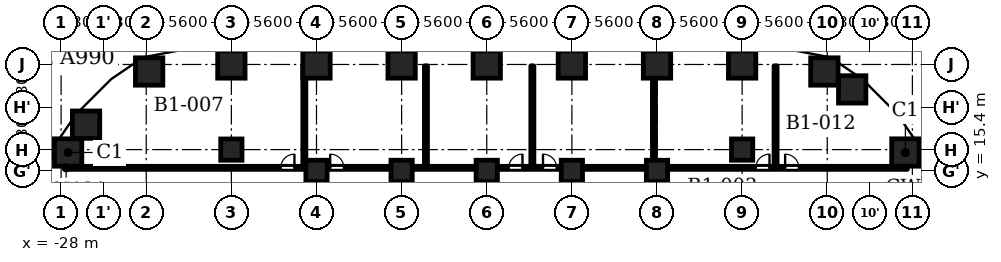
"""IFC4 building model, lengths in metres.
Left out: names, types, materials, properties, quantities, classifications, styles, units other than length and angle.
Written with IfcOpenShell. Run it as: python <this file> out.ifc"""

import sys

from ifc_helpers import new_model, si_unit, direction, frame, frame_2d, origin, origin_2d, place, context, subcontext, project, spatial, polyline, rectangle, outline, extrude, element, fill, save


model = new_model("IFC4")
c1 = context("Model", 3, precision=1e-05, world=origin(), true_north=direction((0.0, 1.0)))
c2 = subcontext(c1, "Body", "Model", "MODEL_VIEW")
j1 = project(units=[si_unit("LENGTHUNIT", "METRE"), si_unit("PLANEANGLEUNIT", "RADIAN")], contexts=[c1])
p1 = place(None, origin())
s1 = spatial("IfcSite", under=j1, at=p1, CompositionType="ELEMENT")
p2 = place(p1, origin())
s2 = spatial("IfcBuilding", under=s1, at=p2, CompositionType="ELEMENT")
p3 = place(p2, frame((0.0, 0.0, -4.5)))
s3 = spatial("IfcBuildingStorey", under=s2, at=p3, CompositionType="ELEMENT", Elevation=-4.5)
p4 = place(p3, frame((0.0, 0.0, -0.5)))
e1 = element("IfcWall", 1, at=p4, inside=s3, PredefinedType="SOLIDWALL", context=c2, shape_type="SweptSolid", body=[
    extrude(outline(polyline([(-29.45, 10.0), (-28.95, 10.0), (-28.95, 14.49), (-28.472, 16.996), (-27.038, 19.105), (-26.144, 20.0), (-26.851, 20.0), (-27.425, 19.426), (-28.944, 17.191), (-29.45, 14.537), (-29.45, 10.0)])), origin(), (0.0, 0.0, 1.0), 5.0),
])
e2 = element("IfcWall", 2, at=p4, inside=s3, PredefinedType="SOLIDWALL", context=c2, shape_type="SweptSolid", body=[
    extrude(outline(polyline([(-26.851, 20.0), (-26.144, 20.0), (-24.705, 21.438), (-22.595, 22.872), (-20.09, 23.35), (-20.0, 23.35), (-20.0, 23.85), (-20.137, 23.85), (-22.791, 23.344), (-25.025, 21.825), (-26.851, 20.0)])), origin(), (0.0, 0.0, 1.0), 5.0),
])
e3 = element("IfcWall", 3, at=p4, inside=s3, PredefinedType="SOLIDWALL", context=c2, shape_type="SweptSolid", body=[
    extrude(outline(polyline([(26.851, 20.0), (26.144, 20.0), (27.038, 19.105), (28.472, 16.996), (28.95, 14.49), (28.95, 10.0), (29.45, 10.0), (29.45, 14.537), (28.944, 17.191), (27.425, 19.426), (26.851, 20.0)])), origin(), (0.0, 0.0, 1.0), 5.0),
])
e4 = element("IfcWall", 4, at=p4, inside=s3, PredefinedType="SOLIDWALL", context=c2, shape_type="SweptSolid", body=[
    extrude(outline(polyline([(20.0, 23.85), (20.0, 23.35), (20.09, 23.35), (22.595, 22.872), (24.705, 21.438), (26.144, 20.0), (26.851, 20.0), (25.025, 21.825), (22.791, 23.344), (20.137, 23.85), (20.0, 23.85)])), origin(), (0.0, 0.0, 1.0), 5.0),
])
for number, where, z_axis, x_axis in (
    (5, (27.538, 16.609, 0.0), (0.0, 0.0, 1.0), (1.0, 0.0, 0.0)),
    (6, (24.04, 20.76, 0.0), (0.0, 0.0, 1.0), (1.0, 0.0, 0.0)),
    (7, (22.209, 21.938, 0.0), (0.0, 0.0, 1.0), (1.0, 0.0, 0.0)),
    (8, (16.8, 22.4, 0.0), (0.0, 0.0, 1.0), (1.0, 0.0, 0.0)),
    (9, (11.2, 22.4, 0.0), (0.0, 0.0, 1.0), (1.0, 0.0, 0.0)),
    (10, (5.6, 22.4, 0.0), (0.0, 0.0, 1.0), (1.0, 0.0, 0.0)),
    (11, (0.0, 22.4, 0.0), (0.0, 0.0, 1.0), (1.0, 0.0, 0.0)),
    (12, (-5.6, 22.4, 0.0), (0.0, 0.0, 1.0), (1.0, 0.0, 0.0)),
    (13, (-11.2, 22.4, 0.0), (0.0, 0.0, 1.0), (1.0, 0.0, 0.0)),
    (14, (-16.8, 22.4, 0.0), (0.0, 0.0, 1.0), (1.0, 0.0, 0.0)),
    (15, (-22.209, 21.938, 0.0), (0.0, 0.0, 1.0), (1.0, 0.0, 0.0)),
    (16, (-26.36, 18.44, 0.0), (0.0, 0.0, 1.0), (1.0, 0.0, 0.0)),
    (17, (-27.538, 16.609, 0.0), (0.0, 0.0, 1.0), (1.0, 0.0, 0.0)),
):
    element("IfcColumn", number, at=place(p3, frame(where, z_axis=z_axis, x_axis=x_axis)), inside=s3, PredefinedType="COLUMN", context=c2, shape_type="SweptSolid", body=[
        extrude(rectangle(XDim=1.8, YDim=1.8, at=origin_2d()), origin(), (0.0, 0.0, 1.0), 4.5),
    ])
for number, where, z_axis, x_axis in (
    (18, (-16.8, 16.8, 0.0), (0.0, 0.0, 1.0), (1.0, 0.0, 0.0)),
    (19, (16.8, 16.8, 0.0), (0.0, 0.0, 1.0), (1.0, 0.0, 0.0)),
    (20, (-11.2, 15.4, 0.0), (0.0, 0.0, 1.0), (1.0, 0.0, 0.0)),
    (21, (-5.6, 15.4, 0.0), (0.0, 0.0, 1.0), (1.0, 0.0, 0.0)),
    (22, (0.0, 15.4, 0.0), (0.0, 0.0, 1.0), (1.0, 0.0, 0.0)),
    (23, (5.6, 15.4, 0.0), (0.0, 0.0, 1.0), (1.0, 0.0, 0.0)),
    (24, (11.2, 15.4, 0.0), (0.0, 0.0, 1.0), (1.0, 0.0, 0.0)),
):
    element("IfcColumn", number, at=place(p3, frame(where, z_axis=z_axis, x_axis=x_axis)), inside=s3, PredefinedType="COLUMN", context=c2, shape_type="SweptSolid", body=[
        extrude(rectangle(XDim=1.4, YDim=1.4, at=origin_2d()), origin(), (0.0, 0.0, 1.0), 4.5),
    ])
p5 = place(p3, frame((-27.67, 15.6, 0.0), z_axis=(0.0, 0.0, 1.0), x_axis=(1.0, 0.0, 0.0)))
e25 = element("IfcWall", 25, at=p5, inside=s3, PredefinedType="PARTITIONING", context=c2, shape_type="SweptSolid", body=[
    extrude(rectangle(XDim=55.34, YDim=0.2, at=frame_2d((27.67, 0.0))), origin(), (0.0, 0.0, 1.0), 4.05),
])
p6 = place(p5, frame((14.12, 0.0, 0.0)))
e26 = element("IfcOpeningElement", 26, at=p6, cuts=e25, PredefinedType="OPENING", context=c2, shape_type="SweptSolid", body=[
    extrude(rectangle(XDim=0.9, YDim=2.1, at=frame_2d((0.45, 1.05))), frame((0.0, 0.11, 0.0), z_axis=(0.0, -1.0, 0.0), x_axis=(1.0, 0.0, 0.0)), (0.0, 0.0, 1.0), 0.22),
])
p7 = place(p5, frame((17.37, 0.0, 0.0)))
e27 = element("IfcOpeningElement", 27, at=p7, cuts=e25, PredefinedType="OPENING", context=c2, shape_type="SweptSolid", body=[
    extrude(rectangle(XDim=0.9, YDim=2.1, at=frame_2d((0.45, 1.05))), frame((0.0, 0.11, 0.0), z_axis=(0.0, -1.0, 0.0), x_axis=(1.0, 0.0, 0.0)), (0.0, 0.0, 1.0), 0.22),
])
p8 = place(p5, frame((29.12, 0.0, 0.0)))
e28 = element("IfcOpeningElement", 28, at=p8, cuts=e25, PredefinedType="OPENING", context=c2, shape_type="SweptSolid", body=[
    extrude(rectangle(XDim=0.9, YDim=2.1, at=frame_2d((0.45, 1.05))), frame((0.0, 0.11, 0.0), z_axis=(0.0, -1.0, 0.0), x_axis=(1.0, 0.0, 0.0)), (0.0, 0.0, 1.0), 0.22),
])
p9 = place(p5, frame((31.37, 0.0, 0.0)))
e29 = element("IfcOpeningElement", 29, at=p9, cuts=e25, PredefinedType="OPENING", context=c2, shape_type="SweptSolid", body=[
    extrude(rectangle(XDim=0.9, YDim=2.1, at=frame_2d((0.45, 1.05))), frame((0.0, 0.11, 0.0), z_axis=(0.0, -1.0, 0.0), x_axis=(1.0, 0.0, 0.0)), (0.0, 0.0, 1.0), 0.22),
])
p10 = place(p5, frame((45.37, 0.0, 0.0)))
e30 = element("IfcOpeningElement", 30, at=p10, cuts=e25, PredefinedType="OPENING", context=c2, shape_type="SweptSolid", body=[
    extrude(rectangle(XDim=0.9, YDim=2.1, at=frame_2d((0.45, 1.05))), frame((0.0, 0.11, 0.0), z_axis=(0.0, -1.0, 0.0), x_axis=(1.0, 0.0, 0.0)), (0.0, 0.0, 1.0), 0.22),
])
p11 = place(p5, frame((47.299, 0.0, 0.0)))
e31 = element("IfcOpeningElement", 31, at=p11, cuts=e25, PredefinedType="OPENING", context=c2, shape_type="SweptSolid", body=[
    extrude(rectangle(XDim=0.9, YDim=2.1, at=frame_2d((0.45, 1.05))), frame((0.0, 0.11, 0.0), z_axis=(0.0, -1.0, 0.0), x_axis=(1.0, 0.0, 0.0)), (0.0, 0.0, 1.0), 0.22),
])
for number, where, z_axis, x_axis in (
    (32, (-12.0, 15.7, 0.0), (0.0, 0.0, 1.0), (0.0, 1.0, 0.0)),
    (33, (-4.0, 15.7, 0.0), (0.0, 0.0, 1.0), (0.0, 1.0, 0.0)),
    (34, (3.0, 15.7, 0.0), (0.0, 0.0, 1.0), (0.0, 1.0, 0.0)),
    (35, (11.0, 15.7, 0.0), (0.0, 0.0, 1.0), (0.0, 1.0, 0.0)),
    (36, (19.0, 15.7, 0.0), (0.0, 0.0, 1.0), (0.0, 1.0, 0.0)),
):
    element("IfcWall", number, at=place(p3, frame(where, z_axis=z_axis, x_axis=x_axis)), inside=s3, PredefinedType="PARTITIONING", context=c2, shape_type="SweptSolid", body=[
        extrude(rectangle(XDim=6.61, YDim=0.2, at=frame_2d((3.305, 0.0))), origin(), (0.0, 0.0, 1.0), 4.05),
    ])
p12 = place(p6, origin())
e37 = element("IfcDoor", 37, at=p12, inside=s3, OperationType="SINGLE_SWING_LEFT", PredefinedType="DOOR", context=c2, shape_type="SweptSolid", body=[
    extrude(rectangle(XDim=0.9, YDim=2.1, at=frame_2d((0.45, 1.05))), frame((0.0, 0.025, 0.0), z_axis=(0.0, -1.0, 0.0), x_axis=(1.0, 0.0, 0.0)), (0.0, 0.0, 1.0), 0.05),
])
fill(e26, e37)
p13 = place(p7, origin())
e38 = element("IfcDoor", 38, at=p13, inside=s3, OperationType="SINGLE_SWING_RIGHT", PredefinedType="DOOR", context=c2, shape_type="SweptSolid", body=[
    extrude(rectangle(XDim=0.9, YDim=2.1, at=frame_2d((0.45, 1.05))), frame((0.0, 0.025, 0.0), z_axis=(0.0, -1.0, 0.0), x_axis=(1.0, 0.0, 0.0)), (0.0, 0.0, 1.0), 0.05),
])
fill(e27, e38)
p14 = place(p8, origin())
e39 = element("IfcDoor", 39, at=p14, inside=s3, OperationType="SINGLE_SWING_LEFT", PredefinedType="DOOR", context=c2, shape_type="SweptSolid", body=[
    extrude(rectangle(XDim=0.9, YDim=2.1, at=frame_2d((0.45, 1.05))), frame((0.0, 0.025, 0.0), z_axis=(0.0, -1.0, 0.0), x_axis=(1.0, 0.0, 0.0)), (0.0, 0.0, 1.0), 0.05),
])
fill(e28, e39)
p15 = place(p9, origin())
e40 = element("IfcDoor", 40, at=p15, inside=s3, OperationType="SINGLE_SWING_RIGHT", PredefinedType="DOOR", context=c2, shape_type="SweptSolid", body=[
    extrude(rectangle(XDim=0.9, YDim=2.1, at=frame_2d((0.45, 1.05))), frame((0.0, 0.025, 0.0), z_axis=(0.0, -1.0, 0.0), x_axis=(1.0, 0.0, 0.0)), (0.0, 0.0, 1.0), 0.05),
])
fill(e29, e40)
p16 = place(p10, origin())
e41 = element("IfcDoor", 41, at=p16, inside=s3, OperationType="SINGLE_SWING_LEFT", PredefinedType="DOOR", context=c2, shape_type="SweptSolid", body=[
    extrude(rectangle(XDim=0.9, YDim=2.1, at=frame_2d((0.45, 1.05))), frame((0.0, 0.025, 0.0), z_axis=(0.0, -1.0, 0.0), x_axis=(1.0, 0.0, 0.0)), (0.0, 0.0, 1.0), 0.05),
])
fill(e30, e41)
p17 = place(p11, origin())
e42 = element("IfcDoor", 42, at=p17, inside=s3, OperationType="SINGLE_SWING_RIGHT", PredefinedType="DOOR", context=c2, shape_type="SweptSolid", body=[
    extrude(rectangle(XDim=0.9, YDim=2.1, at=frame_2d((0.45, 1.05))), frame((0.0, 0.025, 0.0), z_axis=(0.0, -1.0, 0.0), x_axis=(1.0, 0.0, 0.0)), (0.0, 0.0, 1.0), 0.05),
])
fill(e31, e42)
save(model, sys.argv[1])
